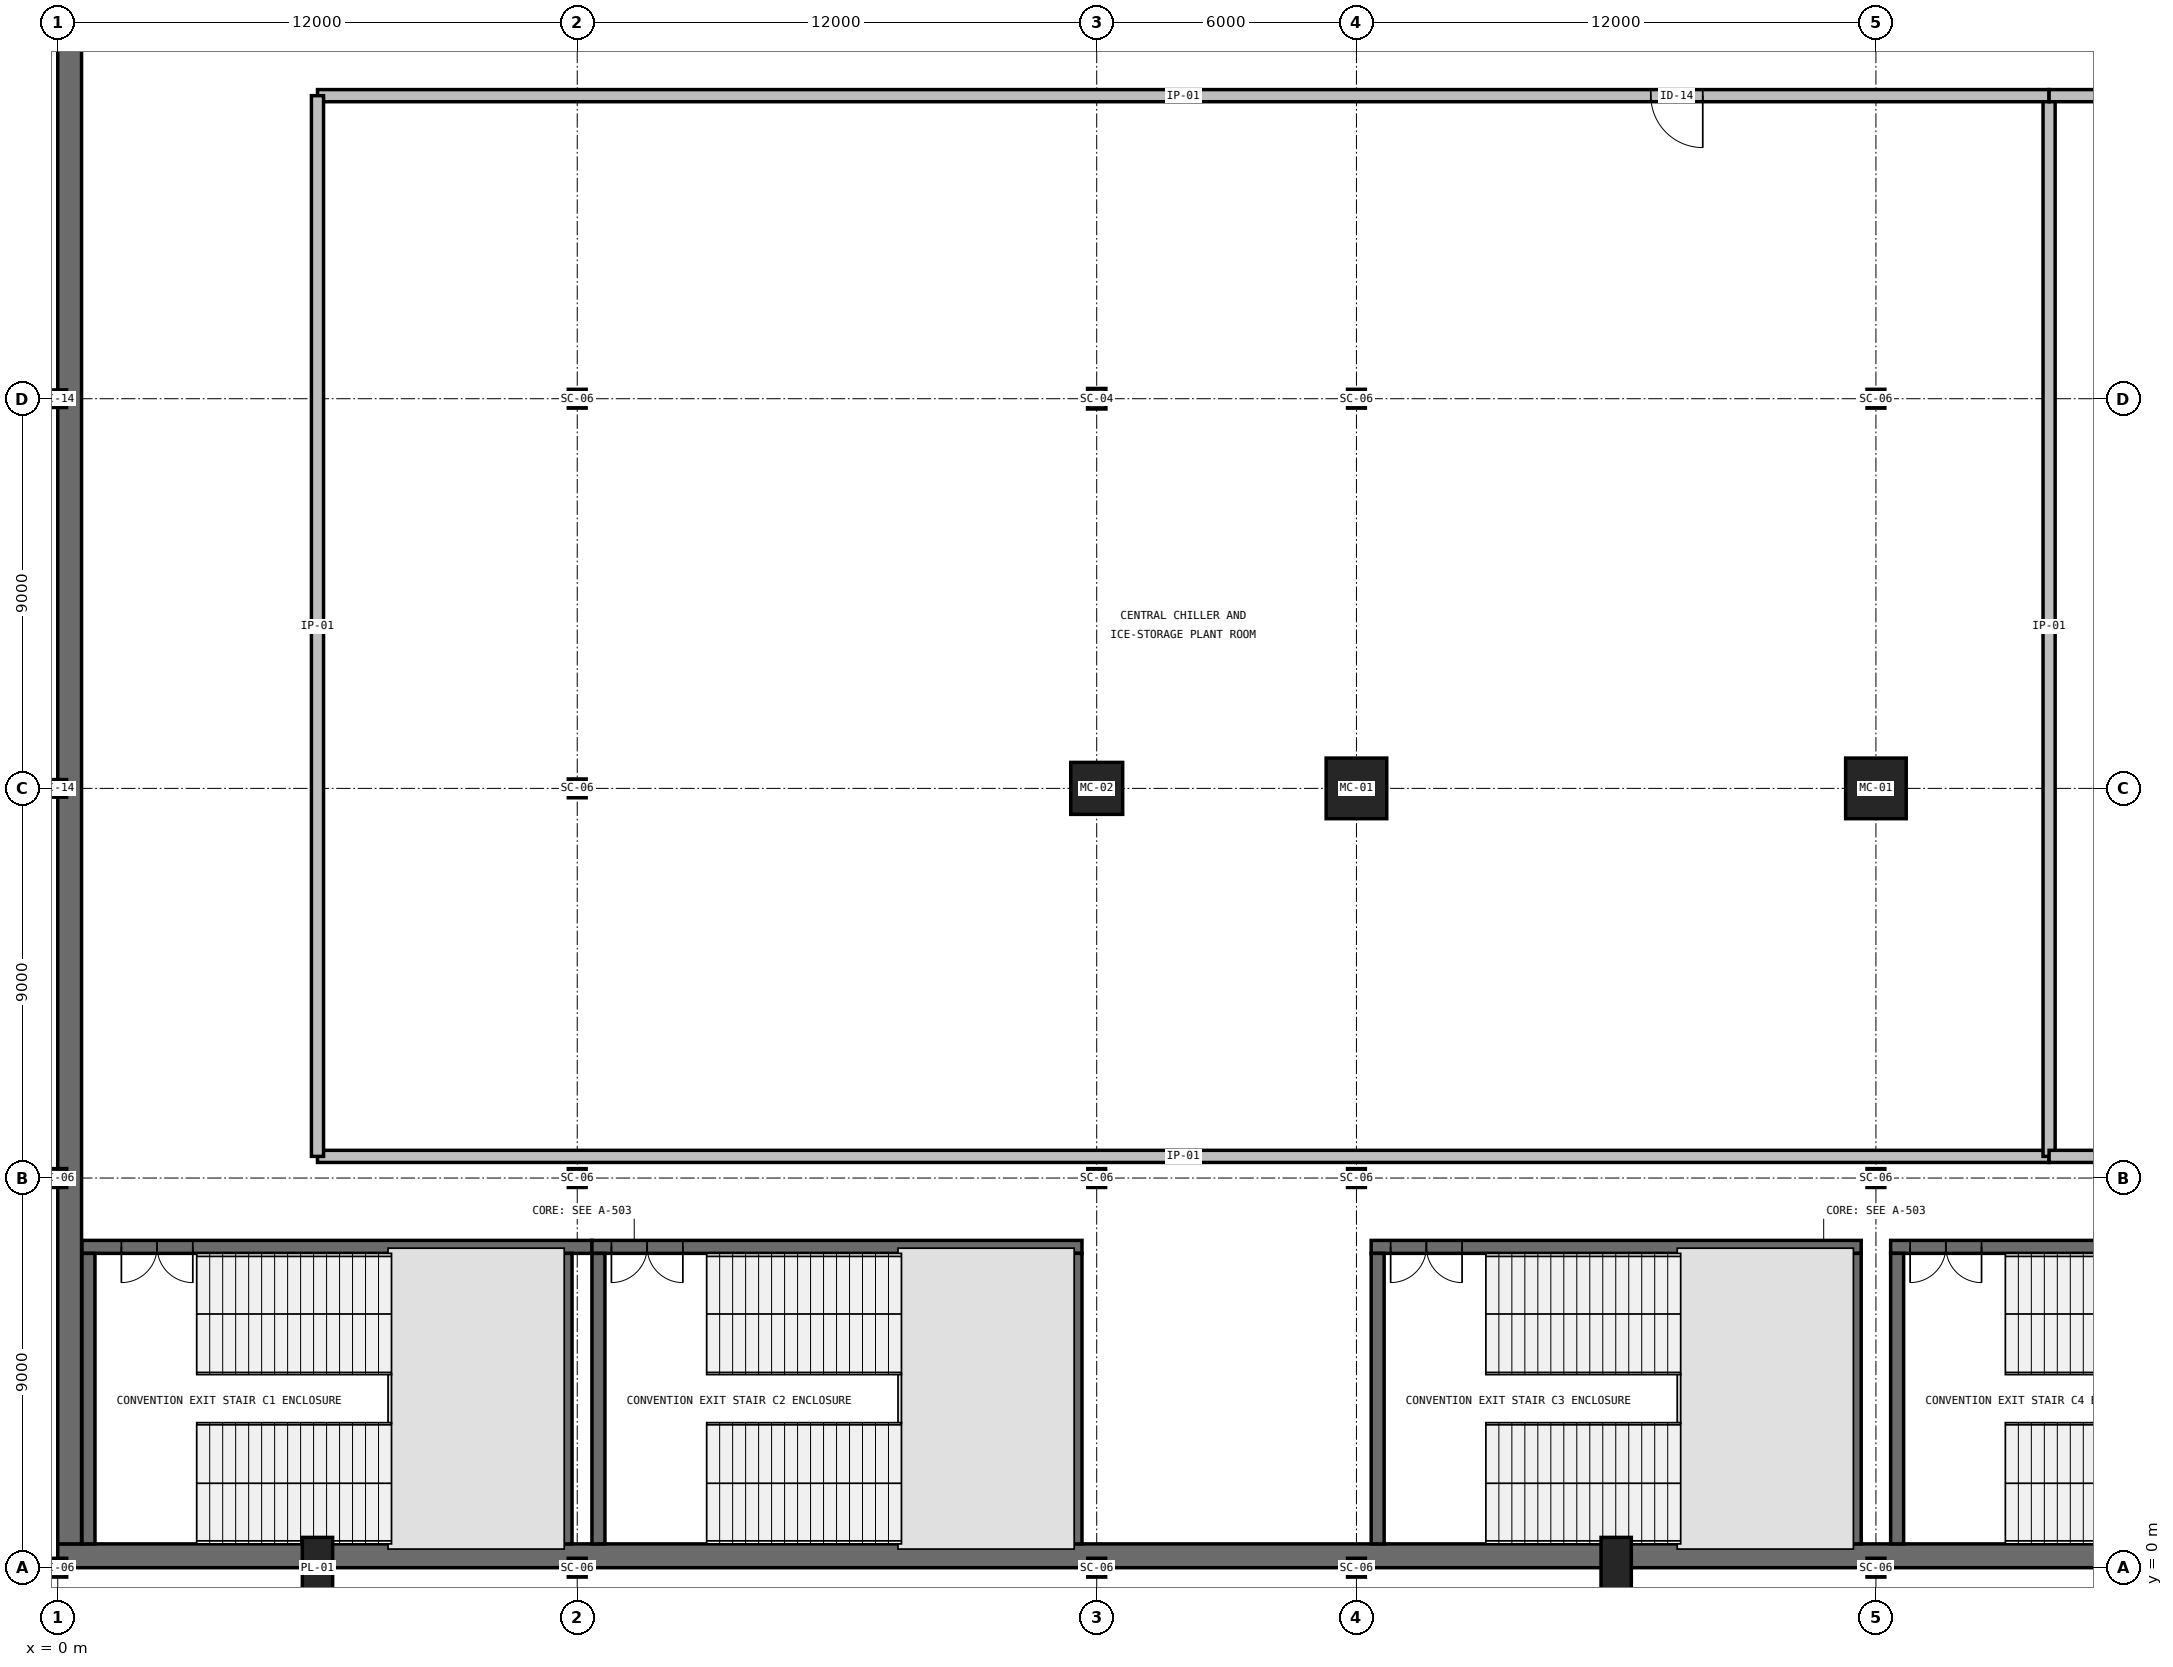
"""IFC4 building model, lengths in metres.
Left out: names, types, materials, properties, quantities, classifications, styles, units other than length and angle.
Written with IfcOpenShell. Run it as: python <this file> out.ifc"""

import sys

from ifc_helpers import new_model, si_unit, direction, frame, frame_2d, origin, origin_2d, place, context, subcontext, project, spatial, rectangle, hollow_rectangle, i_section, extrude, element, fill, save


model = new_model("IFC4")
c1 = context("Model", 3, precision=1e-05, world=origin(), true_north=direction((0.0, 1.0)))
c2 = subcontext(c1, "Body", "Model", "MODEL_VIEW")
j1 = project(units=[si_unit("LENGTHUNIT", "METRE"), si_unit("PLANEANGLEUNIT", "RADIAN")], contexts=[c1])
p1 = place(None, origin())
s1 = spatial("IfcSite", under=j1, at=p1, CompositionType="ELEMENT")
p2 = place(p1, origin())
s2 = spatial("IfcBuilding", under=s1, at=p2, CompositionType="ELEMENT")
p3 = place(p2, frame((0.0, 0.0, -5.4)))
s3 = spatial("IfcBuildingStorey", under=s2, at=p3, CompositionType="ELEMENT", Elevation=-5.4)
for number, where, z_axis, x_axis in (
    (1, (0.0, 0.0, 0.0), (0.0, 0.0, 1.0), (1.0, 0.0, 0.0)),
    (2, (0.0, 9.0, 0.0), (0.0, 0.0, 1.0), (1.0, 0.0, 0.0)),
):
    element("IfcColumn", number, at=place(p3, frame(where, z_axis=z_axis, x_axis=x_axis)), inside=s3, PredefinedType="COLUMN", context=c2, shape_type="SweptSolid", body=[
        extrude(i_section(OverallWidth=0.412, OverallDepth=0.435, WebThickness=0.036, FlangeThickness=0.057, FilletRadius=0.031, at=origin_2d()), origin(), (0.0, 0.0, 1.0), 5.4),
    ])
for number, where, z_axis, x_axis in (
    (3, (0.0, 18.0, 0.0), (0.0, 0.0, 1.0), (1.0, 0.0, 0.0)),
    (4, (0.0, 27.0, 0.0), (0.0, 0.0, 1.0), (1.0, 0.0, 0.0)),
):
    element("IfcColumn", number, at=place(p3, frame(where, z_axis=z_axis, x_axis=x_axis)), inside=s3, PredefinedType="COLUMN", context=c2, shape_type="SweptSolid", body=[
        extrude(hollow_rectangle(XDim=0.406, YDim=0.406, WallThickness=0.015, at=origin_2d()), origin(), (0.0, 0.0, 1.0), 5.4),
    ])
for number, where, z_axis, x_axis in (
    (5, (12.0, 0.0, 0.0), (0.0, 0.0, 1.0), (1.0, 0.0, 0.0)),
    (6, (12.0, 9.0, 0.0), (0.0, 0.0, 1.0), (1.0, 0.0, 0.0)),
    (7, (12.0, 18.0, 0.0), (0.0, 0.0, 1.0), (1.0, 0.0, 0.0)),
    (8, (12.0, 27.0, 0.0), (0.0, 0.0, 1.0), (1.0, 0.0, 0.0)),
    (9, (24.0, 0.0, 0.0), (0.0, 0.0, 1.0), (1.0, 0.0, 0.0)),
    (10, (24.0, 9.0, 0.0), (0.0, 0.0, 1.0), (1.0, 0.0, 0.0)),
):
    element("IfcColumn", number, at=place(p3, frame(where, z_axis=z_axis, x_axis=x_axis)), inside=s3, PredefinedType="COLUMN", context=c2, shape_type="SweptSolid", body=[
        extrude(i_section(OverallWidth=0.412, OverallDepth=0.435, WebThickness=0.036, FlangeThickness=0.057, FilletRadius=0.031, at=origin_2d()), origin(), (0.0, 0.0, 1.0), 5.4),
    ])
p4 = place(p3, frame((24.0, 18.0, 0.0), z_axis=(0.0, 0.0, 1.0), x_axis=(1.0, 0.0, 0.0)))
e11 = element("IfcColumn", 11, at=p4, inside=s3, PredefinedType="COLUMN", context=c2, shape_type="SweptSolid", body=[
    extrude(rectangle(XDim=1.2, YDim=1.2, at=origin_2d()), origin(), (0.0, 0.0, 1.0), 5.4),
])
p5 = place(p3, frame((24.0, 27.0, 0.0), z_axis=(0.0, 0.0, 1.0), x_axis=(1.0, 0.0, 0.0)))
e12 = element("IfcColumn", 12, at=p5, inside=s3, PredefinedType="COLUMN", context=c2, shape_type="SweptSolid", body=[
    extrude(i_section(OverallWidth=0.424, OverallDepth=0.474, WebThickness=0.048, FlangeThickness=0.077, FilletRadius=0.031, at=origin_2d()), origin(), (0.0, 0.0, 1.0), 5.4),
])
for number, where, z_axis, x_axis in (
    (13, (30.0, 0.0, 0.0), (0.0, 0.0, 1.0), (1.0, 0.0, 0.0)),
    (14, (30.0, 9.0, 0.0), (0.0, 0.0, 1.0), (1.0, 0.0, 0.0)),
):
    element("IfcColumn", number, at=place(p3, frame(where, z_axis=z_axis, x_axis=x_axis)), inside=s3, PredefinedType="COLUMN", context=c2, shape_type="SweptSolid", body=[
        extrude(i_section(OverallWidth=0.412, OverallDepth=0.435, WebThickness=0.036, FlangeThickness=0.057, FilletRadius=0.031, at=origin_2d()), origin(), (0.0, 0.0, 1.0), 5.4),
    ])
p6 = place(p3, frame((30.0, 18.0, 0.0), z_axis=(0.0, 0.0, 1.0), x_axis=(1.0, 0.0, 0.0)))
e15 = element("IfcColumn", 15, at=p6, inside=s3, PredefinedType="COLUMN", context=c2, shape_type="SweptSolid", body=[
    extrude(rectangle(XDim=1.4, YDim=1.4, at=origin_2d()), origin(), (0.0, 0.0, 1.0), 5.4),
])
for number, where, z_axis, x_axis in (
    (16, (30.0, 27.0, 0.0), (0.0, 0.0, 1.0), (1.0, 0.0, 0.0)),
    (17, (42.0, 0.0, 0.0), (0.0, 0.0, 1.0), (1.0, 0.0, 0.0)),
    (18, (42.0, 9.0, 0.0), (0.0, 0.0, 1.0), (1.0, 0.0, 0.0)),
):
    element("IfcColumn", number, at=place(p3, frame(where, z_axis=z_axis, x_axis=x_axis)), inside=s3, PredefinedType="COLUMN", context=c2, shape_type="SweptSolid", body=[
        extrude(i_section(OverallWidth=0.412, OverallDepth=0.435, WebThickness=0.036, FlangeThickness=0.057, FilletRadius=0.031, at=origin_2d()), origin(), (0.0, 0.0, 1.0), 5.4),
    ])
p7 = place(p3, frame((42.0, 18.0, 0.0), z_axis=(0.0, 0.0, 1.0), x_axis=(1.0, 0.0, 0.0)))
e19 = element("IfcColumn", 19, at=p7, inside=s3, PredefinedType="COLUMN", context=c2, shape_type="SweptSolid", body=[
    extrude(rectangle(XDim=1.4, YDim=1.4, at=origin_2d()), origin(), (0.0, 0.0, 1.0), 5.4),
])
p8 = place(p3, frame((42.0, 27.0, 0.0), z_axis=(0.0, 0.0, 1.0), x_axis=(1.0, 0.0, 0.0)))
e20 = element("IfcColumn", 20, at=p8, inside=s3, PredefinedType="COLUMN", context=c2, shape_type="SweptSolid", body=[
    extrude(i_section(OverallWidth=0.412, OverallDepth=0.435, WebThickness=0.036, FlangeThickness=0.057, FilletRadius=0.031, at=origin_2d()), origin(), (0.0, 0.0, 1.0), 5.4),
])
for number, where, z_axis, x_axis in (
    (21, (6.0, 0.0, 0.0), (0.0, 0.0, 1.0), (1.0, 0.0, 0.0)),
    (22, (36.0, 0.0, 0.0), (0.0, 0.0, 1.0), (1.0, 0.0, 0.0)),
):
    element("IfcColumn", number, at=place(p3, frame(where, z_axis=z_axis, x_axis=x_axis)), inside=s3, PredefinedType="PILASTER", context=c2, shape_type="SweptSolid", body=[
        extrude(rectangle(XDim=0.7, YDim=1.4, at=origin_2d()), origin(), (0.0, 0.0, 1.0), 5.4),
    ])
p9 = place(p3, frame((0.0, 0.275, 0.0), z_axis=(0.0, 0.0, 1.0), x_axis=(1.0, 0.0, 0.0)))
e23 = element("IfcWall", 23, at=p9, inside=s3, PredefinedType="SOLIDWALL", context=c2, shape_type="SweptSolid", body=[
    extrude(rectangle(XDim=174.0, YDim=0.55, at=frame_2d((87.0, 0.0))), origin(), (0.0, 0.0, 1.0), 5.02),
])
p10 = place(p3, frame((0.275, 116.45, 0.0), z_axis=(0.0, 0.0, 1.0), x_axis=(0.0, -1.0, 0.0)))
e24 = element("IfcWall", 24, at=p10, inside=s3, PredefinedType="SOLIDWALL", context=c2, shape_type="SweptSolid", body=[
    extrude(rectangle(XDim=115.9, YDim=0.55, at=frame_2d((57.95, 0.0))), origin(), (0.0, 0.0, 1.0), 5.02),
])
p11 = place(p3, frame((12.34, 7.41, 0.0), z_axis=(0.0, 0.0, 1.0), x_axis=(-1.0, 0.0, 0.0)))
e25 = element("IfcWall", 25, at=p11, inside=s3, PredefinedType="SHEAR", context=c2, shape_type="SweptSolid", body=[
    extrude(rectangle(XDim=11.78, YDim=0.3, at=frame_2d((5.89, 0.0))), origin(), (0.0, 0.0, 1.0), 5.4),
])
p12 = place(p11, frame((9.22, 0.0, 0.0)))
e26 = element("IfcOpeningElement", 26, at=p12, cuts=e25, PredefinedType="OPENING", context=c2, shape_type="SweptSolid", body=[
    extrude(rectangle(XDim=1.65, YDim=2.25, at=frame_2d((0.825, 1.125))), frame((0.0, 0.165, 0.0), z_axis=(0.0, -1.0, 0.0), x_axis=(1.0, 0.0, 0.0)), (0.0, 0.0, 1.0), 0.33),
])
for number, where, z_axis, x_axis in (
    (27, (0.71, 7.26, 0.0), (0.0, 0.0, 1.0), (0.0, -1.0, 0.0)),
    (28, (11.73, 0.55, 0.0), (0.0, 0.0, 1.0), (0.0, 1.0, 0.0)),
):
    element("IfcWall", number, at=place(p3, frame(where, z_axis=z_axis, x_axis=x_axis)), inside=s3, PredefinedType="SHEAR", context=c2, shape_type="SweptSolid", body=[
        extrude(rectangle(XDim=6.71, YDim=0.3, at=frame_2d((3.355, 0.0))), origin(), (0.0, 0.0, 1.0), 5.4),
    ])
p13 = place(p3, frame((23.66, 7.41, 0.0), z_axis=(0.0, 0.0, 1.0), x_axis=(-1.0, 0.0, 0.0)))
e29 = element("IfcWall", 29, at=p13, inside=s3, PredefinedType="SHEAR", context=c2, shape_type="SweptSolid", body=[
    extrude(rectangle(XDim=11.32, YDim=0.3, at=frame_2d((5.66, 0.0))), origin(), (0.0, 0.0, 1.0), 5.4),
])
p14 = place(p13, frame((9.22, 0.0, 0.0)))
e30 = element("IfcOpeningElement", 30, at=p14, cuts=e29, PredefinedType="OPENING", context=c2, shape_type="SweptSolid", body=[
    extrude(rectangle(XDim=1.65, YDim=2.25, at=frame_2d((0.825, 1.125))), frame((0.0, 0.165, 0.0), z_axis=(0.0, -1.0, 0.0), x_axis=(1.0, 0.0, 0.0)), (0.0, 0.0, 1.0), 0.33),
])
for number, where, z_axis, x_axis in (
    (31, (12.49, 7.26, 0.0), (0.0, 0.0, 1.0), (0.0, -1.0, 0.0)),
    (32, (23.51, 0.55, 0.0), (0.0, 0.0, 1.0), (0.0, 1.0, 0.0)),
):
    element("IfcWall", number, at=place(p3, frame(where, z_axis=z_axis, x_axis=x_axis)), inside=s3, PredefinedType="SHEAR", context=c2, shape_type="SweptSolid", body=[
        extrude(rectangle(XDim=6.71, YDim=0.3, at=frame_2d((3.355, 0.0))), origin(), (0.0, 0.0, 1.0), 5.4),
    ])
p15 = place(p3, frame((41.66, 7.41, 0.0), z_axis=(0.0, 0.0, 1.0), x_axis=(-1.0, 0.0, 0.0)))
e33 = element("IfcWall", 33, at=p15, inside=s3, PredefinedType="SHEAR", context=c2, shape_type="SweptSolid", body=[
    extrude(rectangle(XDim=11.32, YDim=0.3, at=frame_2d((5.66, 0.0))), origin(), (0.0, 0.0, 1.0), 5.4),
])
p16 = place(p15, frame((9.22, 0.0, 0.0)))
e34 = element("IfcOpeningElement", 34, at=p16, cuts=e33, PredefinedType="OPENING", context=c2, shape_type="SweptSolid", body=[
    extrude(rectangle(XDim=1.65, YDim=2.25, at=frame_2d((0.825, 1.125))), frame((0.0, 0.165, 0.0), z_axis=(0.0, -1.0, 0.0), x_axis=(1.0, 0.0, 0.0)), (0.0, 0.0, 1.0), 0.33),
])
for number, where, z_axis, x_axis in (
    (35, (30.49, 7.26, 0.0), (0.0, 0.0, 1.0), (0.0, -1.0, 0.0)),
    (36, (41.51, 0.55, 0.0), (0.0, 0.0, 1.0), (0.0, 1.0, 0.0)),
):
    element("IfcWall", number, at=place(p3, frame(where, z_axis=z_axis, x_axis=x_axis)), inside=s3, PredefinedType="SHEAR", context=c2, shape_type="SweptSolid", body=[
        extrude(rectangle(XDim=6.71, YDim=0.3, at=frame_2d((3.355, 0.0))), origin(), (0.0, 0.0, 1.0), 5.4),
    ])
p17 = place(p3, frame((53.66, 7.41, 0.0), z_axis=(0.0, 0.0, 1.0), x_axis=(-1.0, 0.0, 0.0)))
e37 = element("IfcWall", 37, at=p17, inside=s3, PredefinedType="SHEAR", context=c2, shape_type="SweptSolid", body=[
    extrude(rectangle(XDim=11.32, YDim=0.3, at=frame_2d((5.66, 0.0))), origin(), (0.0, 0.0, 1.0), 5.4),
])
p18 = place(p17, frame((9.22, 0.0, 0.0)))
e38 = element("IfcOpeningElement", 38, at=p18, cuts=e37, PredefinedType="OPENING", context=c2, shape_type="SweptSolid", body=[
    extrude(rectangle(XDim=1.65, YDim=2.25, at=frame_2d((0.825, 1.125))), frame((0.0, 0.165, 0.0), z_axis=(0.0, -1.0, 0.0), x_axis=(1.0, 0.0, 0.0)), (0.0, 0.0, 1.0), 0.33),
])
p19 = place(p3, frame((42.49, 7.26, 0.0), z_axis=(0.0, 0.0, 1.0), x_axis=(0.0, -1.0, 0.0)))
e39 = element("IfcWall", 39, at=p19, inside=s3, PredefinedType="SHEAR", context=c2, shape_type="SweptSolid", body=[
    extrude(rectangle(XDim=6.71, YDim=0.3, at=frame_2d((3.355, 0.0))), origin(), (0.0, 0.0, 1.0), 5.4),
])
p20 = place(p3, frame((6.0, 9.5, 0.0), z_axis=(0.0, 0.0, 1.0), x_axis=(1.0, 0.0, 0.0)))
e40 = element("IfcWall", 40, at=p20, inside=s3, PredefinedType="PARTITIONING", context=c2, shape_type="SweptSolid", body=[
    extrude(rectangle(XDim=40.0, YDim=0.28, at=frame_2d((20.0, 0.0))), origin(), (0.0, 0.0, 1.0), 4.96),
])
p21 = place(p3, frame((46.0, 9.5, 0.0), z_axis=(0.0, 0.0, 1.0), x_axis=(0.0, 1.0, 0.0)))
e41 = element("IfcWall", 41, at=p21, inside=s3, PredefinedType="PARTITIONING", context=c2, shape_type="SweptSolid", body=[
    extrude(rectangle(XDim=24.5, YDim=0.28, at=frame_2d((12.25, 0.0))), origin(), (0.0, 0.0, 1.0), 4.96),
])
p22 = place(p3, frame((46.0, 34.0, 0.0), z_axis=(0.0, 0.0, 1.0), x_axis=(-1.0, 0.0, 0.0)))
e42 = element("IfcWall", 42, at=p22, inside=s3, PredefinedType="PARTITIONING", context=c2, shape_type="SweptSolid", body=[
    extrude(rectangle(XDim=40.0, YDim=0.28, at=frame_2d((20.0, 0.0))), origin(), (0.0, 0.0, 1.0), 4.96),
])
p23 = place(p22, frame((8.0, 0.0, 0.0)))
e43 = element("IfcOpeningElement", 43, at=p23, cuts=e42, PredefinedType="OPENING", context=c2, shape_type="SweptSolid", body=[
    extrude(rectangle(XDim=1.2, YDim=2.2, at=frame_2d((0.6, 1.1))), frame((0.0, 0.155, 0.0), z_axis=(0.0, -1.0, 0.0), x_axis=(1.0, 0.0, 0.0)), (0.0, 0.0, 1.0), 0.31),
])
p24 = place(p3, frame((6.0, 34.0, 0.0), z_axis=(0.0, 0.0, 1.0), x_axis=(0.0, -1.0, 0.0)))
e44 = element("IfcWall", 44, at=p24, inside=s3, PredefinedType="PARTITIONING", context=c2, shape_type="SweptSolid", body=[
    extrude(rectangle(XDim=24.5, YDim=0.28, at=frame_2d((12.25, 0.0))), origin(), (0.0, 0.0, 1.0), 4.96),
])
p25 = place(p3, frame((46.0, 9.5, 0.0), z_axis=(0.0, 0.0, 1.0), x_axis=(1.0, 0.0, 0.0)))
e45 = element("IfcWall", 45, at=p25, inside=s3, PredefinedType="PARTITIONING", context=c2, shape_type="SweptSolid", body=[
    extrude(rectangle(XDim=36.0, YDim=0.28, at=frame_2d((18.0, 0.0))), origin(), (0.0, 0.0, 1.0), 4.96),
])
p26 = place(p3, frame((82.0, 34.0, 0.0), z_axis=(0.0, 0.0, 1.0), x_axis=(-1.0, 0.0, 0.0)))
e46 = element("IfcWall", 46, at=p26, inside=s3, PredefinedType="PARTITIONING", context=c2, shape_type="SweptSolid", body=[
    extrude(rectangle(XDim=36.0, YDim=0.28, at=frame_2d((18.0, 0.0))), origin(), (0.0, 0.0, 1.0), 4.96),
])
p27 = place(p26, frame((7.0, 0.0, 0.0)))
e47 = element("IfcOpeningElement", 47, at=p27, cuts=e46, PredefinedType="OPENING", context=c2, shape_type="SweptSolid", body=[
    extrude(rectangle(XDim=1.2, YDim=2.2, at=frame_2d((0.6, 1.1))), frame((0.0, 0.155, 0.0), z_axis=(0.0, -1.0, 0.0), x_axis=(1.0, 0.0, 0.0)), (0.0, 0.0, 1.0), 0.31),
])
p28 = place(p12, origin())
e48 = element("IfcDoor", 48, at=p28, inside=s3, OperationType="DOUBLE_DOOR_SINGLE_SWING", PredefinedType="DOOR", context=c2, shape_type="SweptSolid", body=[
    extrude(rectangle(XDim=1.65, YDim=2.25, at=frame_2d((0.825, 1.125))), frame((0.0, 0.025, 0.0), z_axis=(0.0, -1.0, 0.0), x_axis=(1.0, 0.0, 0.0)), (0.0, 0.0, 1.0), 0.05),
])
fill(e26, e48)
p29 = place(p14, origin())
e49 = element("IfcDoor", 49, at=p29, inside=s3, OperationType="DOUBLE_DOOR_SINGLE_SWING", PredefinedType="DOOR", context=c2, shape_type="SweptSolid", body=[
    extrude(rectangle(XDim=1.65, YDim=2.25, at=frame_2d((0.825, 1.125))), frame((0.0, 0.025, 0.0), z_axis=(0.0, -1.0, 0.0), x_axis=(1.0, 0.0, 0.0)), (0.0, 0.0, 1.0), 0.05),
])
fill(e30, e49)
p30 = place(p16, origin())
e50 = element("IfcDoor", 50, at=p30, inside=s3, OperationType="DOUBLE_DOOR_SINGLE_SWING", PredefinedType="DOOR", context=c2, shape_type="SweptSolid", body=[
    extrude(rectangle(XDim=1.65, YDim=2.25, at=frame_2d((0.825, 1.125))), frame((0.0, 0.025, 0.0), z_axis=(0.0, -1.0, 0.0), x_axis=(1.0, 0.0, 0.0)), (0.0, 0.0, 1.0), 0.05),
])
fill(e34, e50)
p31 = place(p18, origin())
e51 = element("IfcDoor", 51, at=p31, inside=s3, OperationType="DOUBLE_DOOR_SINGLE_SWING", PredefinedType="DOOR", context=c2, shape_type="SweptSolid", body=[
    extrude(rectangle(XDim=1.65, YDim=2.25, at=frame_2d((0.825, 1.125))), frame((0.0, 0.025, 0.0), z_axis=(0.0, -1.0, 0.0), x_axis=(1.0, 0.0, 0.0)), (0.0, 0.0, 1.0), 0.05),
])
fill(e38, e51)
p32 = place(p23, origin())
e52 = element("IfcDoor", 52, at=p32, inside=s3, OperationType="SINGLE_SWING_LEFT", PredefinedType="DOOR", context=c2, shape_type="SweptSolid", body=[
    extrude(rectangle(XDim=1.2, YDim=2.2, at=frame_2d((0.6, 1.1))), frame((0.0, 0.025, 0.0), z_axis=(0.0, -1.0, 0.0), x_axis=(1.0, 0.0, 0.0)), (0.0, 0.0, 1.0), 0.05),
])
fill(e43, e52)
save(model, sys.argv[1])
